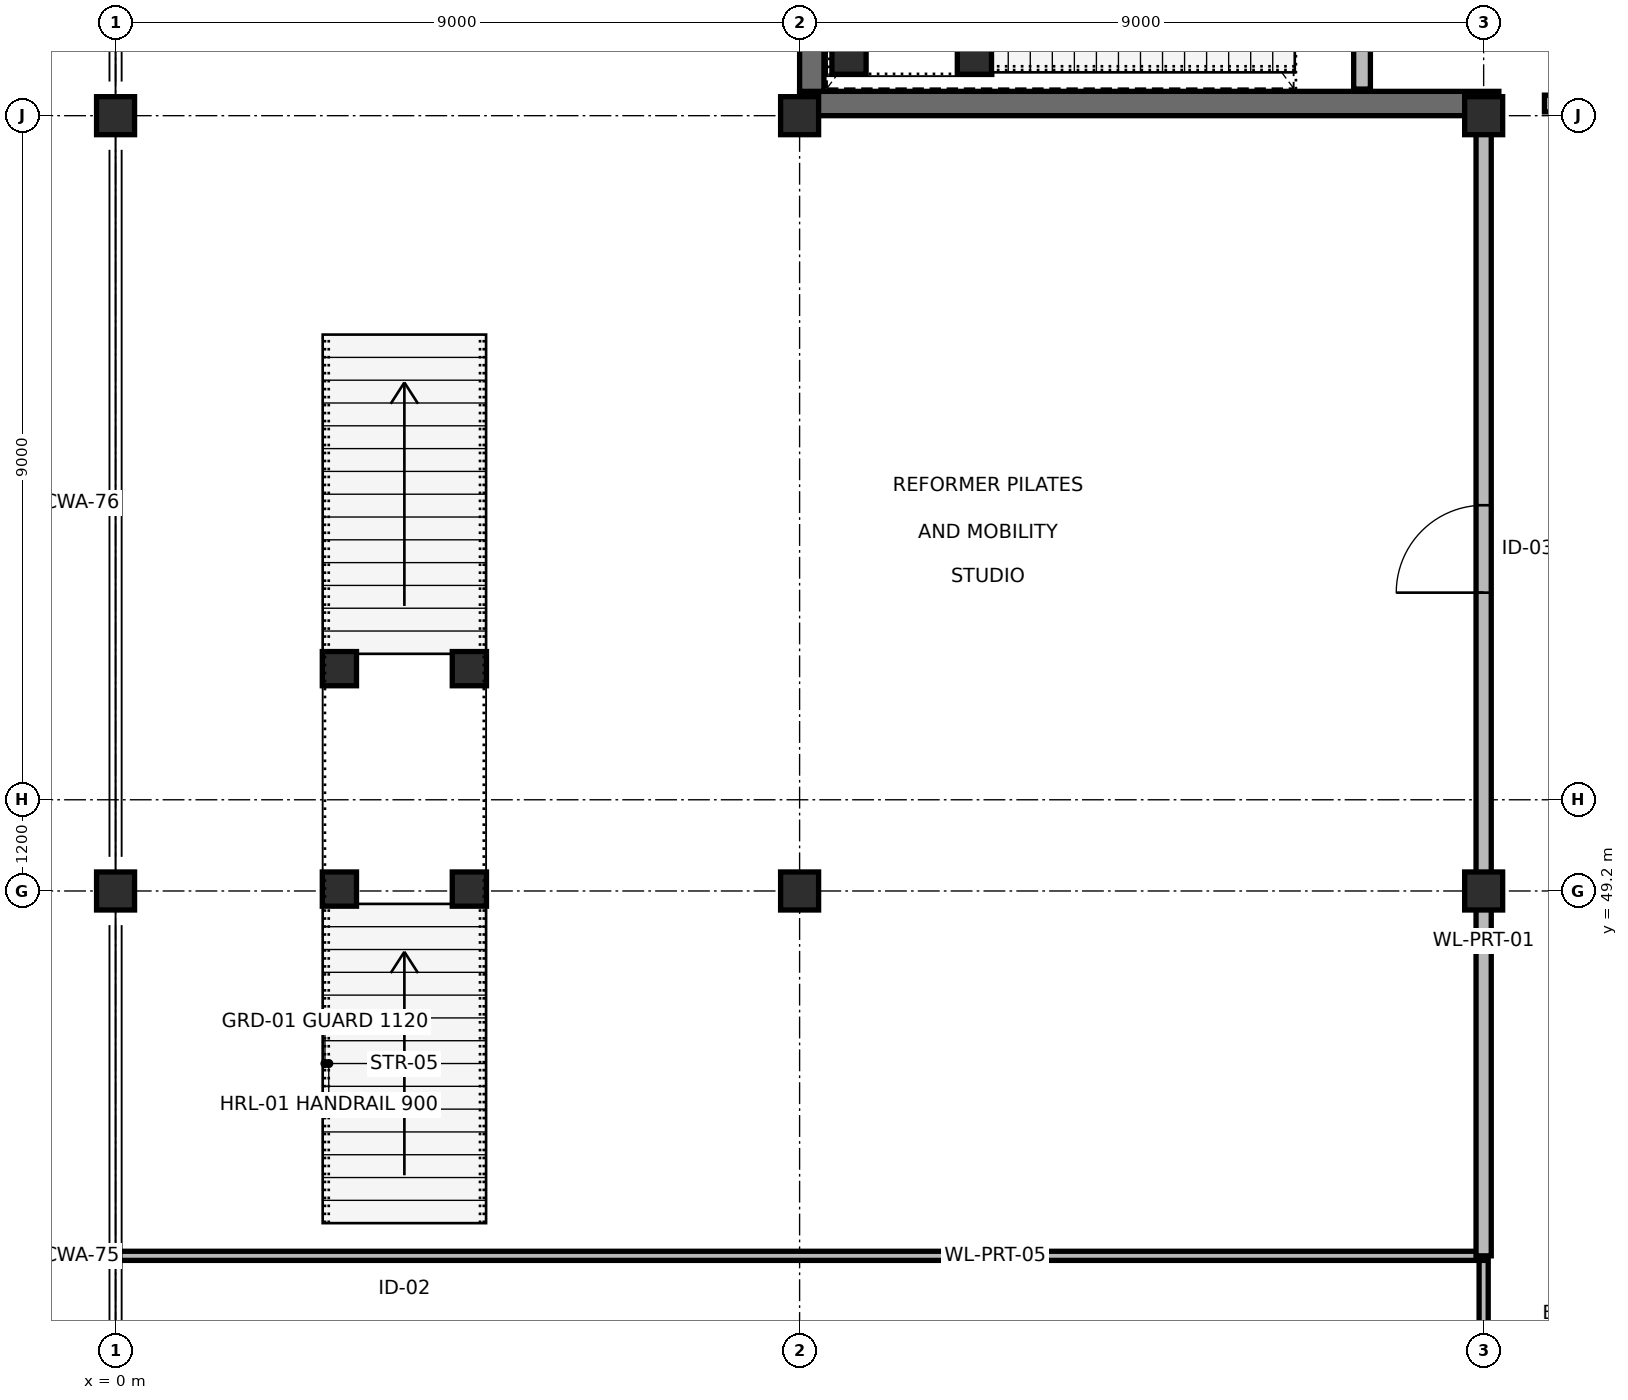
"""IFC4 building model, lengths in metres.
Left out: names, types, materials, properties, quantities, classifications, styles, units other than length and angle.
Written with IfcOpenShell. Run it as: python <this file> out.ifc"""

import sys

from ifc_helpers import new_model, si_unit, direction, frame, frame_2d, origin, origin_2d, place, context, subcontext, project, spatial, rectangle, extrude, element, fill, save


model = new_model("IFC4")
c1 = context("Model", 3, precision=1e-05, world=origin(), true_north=direction((0.0, 1.0)))
c2 = subcontext(c1, "Body", "Model", "MODEL_VIEW")
j1 = project(units=[si_unit("LENGTHUNIT", "METRE"), si_unit("PLANEANGLEUNIT", "RADIAN")], contexts=[c1])
p1 = place(None, origin())
s1 = spatial("IfcSite", under=j1, at=p1, CompositionType="ELEMENT")
p2 = place(p1, origin())
s2 = spatial("IfcBuilding", under=s1, at=p2, CompositionType="ELEMENT")
p3 = place(p2, frame((0.0, 0.0, 14.1)))
s3 = spatial("IfcBuildingStorey", under=s2, at=p3, CompositionType="ELEMENT", Elevation=14.1)
for number, where, z_axis, x_axis in (
    (1, (0.0, 49.2, 0.0), (0.0, 0.0, 1.0), (1.0, 0.0, 0.0)),
    (2, (0.0, 59.4, 0.0), (0.0, 0.0, 1.0), (1.0, 0.0, 0.0)),
    (3, (9.0, 49.2, 0.0), (0.0, 0.0, 1.0), (1.0, 0.0, 0.0)),
    (4, (9.0, 59.4, 0.0), (0.0, 0.0, 1.0), (1.0, 0.0, 0.0)),
    (5, (18.0, 49.2, 0.0), (0.0, 0.0, 1.0), (1.0, 0.0, 0.0)),
    (6, (18.0, 59.4, 0.0), (0.0, 0.0, 1.0), (1.0, 0.0, 0.0)),
):
    element("IfcColumn", number, at=place(p3, frame(where, z_axis=z_axis, x_axis=x_axis)), inside=s3, PredefinedType="COLUMN", context=c2, shape_type="SweptSolid", body=[
        extrude(rectangle(XDim=0.5, YDim=0.5, at=origin_2d()), origin(), (0.0, 0.0, 1.0), 4.5),
    ])
for number, where, z_axis, x_axis in (
    (7, (2.945, 49.225, 0.0), (0.0, 0.0, 1.0), (1.0, 0.0, 0.0)),
    (8, (2.945, 52.125, 0.0), (0.0, 0.0, 1.0), (1.0, 0.0, 0.0)),
    (9, (4.655, 49.225, 0.0), (0.0, 0.0, 1.0), (1.0, 0.0, 0.0)),
    (10, (4.655, 52.125, 0.0), (0.0, 0.0, 1.0), (1.0, 0.0, 0.0)),
):
    element("IfcColumn", number, at=place(p3, frame(where, z_axis=z_axis, x_axis=x_axis)), inside=s3, PredefinedType="COLUMN", context=c2, shape_type="SweptSolid", body=[
        extrude(rectangle(XDim=0.45, YDim=0.45, at=origin_2d()), origin(), (0.0, 0.0, 1.0), 2.09),
    ])
p4 = place(p3, frame((9.0, 59.56, 0.0), z_axis=(0.0, 0.0, 1.0), x_axis=(1.0, 0.0, 0.0)))
e11 = element("IfcWall", 11, at=p4, inside=s3, PredefinedType="SHEAR", context=c2, shape_type="SweptSolid", body=[
    extrude(rectangle(XDim=9.2, YDim=0.32, at=frame_2d((4.6, 0.0))), origin(), (0.0, 0.0, 1.0), 4.5),
])
p5 = place(p3, frame((9.16, 59.72, 0.0), z_axis=(0.0, 0.0, 1.0), x_axis=(0.0, 1.0, 0.0)))
e12 = element("IfcWall", 12, at=p5, inside=s3, PredefinedType="SHEAR", context=c2, shape_type="SweptSolid", body=[
    extrude(rectangle(XDim=8.36, YDim=0.32, at=frame_2d((4.18, 0.0))), origin(), (0.0, 0.0, 1.0), 4.5),
])
p6 = place(p3, frame((16.4, 59.75, 0.0), z_axis=(0.0, 0.0, 1.0), x_axis=(0.0, 1.0, 0.0)))
e13 = element("IfcWall", 13, at=p6, inside=s3, PredefinedType="PARTITIONING", context=c2, shape_type="SweptSolid", body=[
    extrude(rectangle(XDim=3.25, YDim=0.22, at=frame_2d((1.625, 0.0))), origin(), (0.0, 0.0, 1.0), 3.585),
])
p7 = place(p3, frame((18.8, 59.56, 0.0), z_axis=(0.0, 0.0, 1.0), x_axis=(1.0, 0.0, 0.0)))
e14 = element("IfcWall", 14, at=p7, inside=s3, PredefinedType="PARTITIONING", context=c2, shape_type="SweptSolid", body=[
    extrude(rectangle(XDim=4.35, YDim=0.22, at=frame_2d((2.175, 0.0))), origin(), (0.0, 0.0, 1.0), 3.585),
])
p8 = place(p7, frame((0.55, 0.0, 0.0)))
e15 = element("IfcOpeningElement", 15, at=p8, cuts=e14, PredefinedType="OPENING", context=c2, shape_type="SweptSolid", body=[
    extrude(rectangle(XDim=1.8, YDim=2.2, at=frame_2d((0.9, 1.1))), frame((0.0, 0.12, 0.0), z_axis=(0.0, -1.0, 0.0), x_axis=(1.0, 0.0, 0.0)), (0.0, 0.0, 1.0), 0.24),
])
p9 = place(p3, frame((18.0, 22.2, 0.0), z_axis=(0.0, 0.0, 1.0), x_axis=(0.0, 1.0, 0.0)))
e16 = element("IfcWall", 16, at=p9, inside=s3, PredefinedType="PARTITIONING", context=c2, shape_type="SweptSolid", body=[
    extrude(rectangle(XDim=22.2, YDim=0.12, at=frame_2d((11.1, 0.0))), origin(), (0.0, 0.0, 1.0), 3.485),
])
p10 = place(p9, frame((10.65, 0.0, 0.0)))
e17 = element("IfcOpeningElement", 17, at=p10, cuts=e16, PredefinedType="OPENING", context=c2, shape_type="SweptSolid", body=[
    extrude(rectangle(XDim=0.9, YDim=2.1, at=frame_2d((0.45, 1.05))), frame((0.0, 0.07, 0.0), z_axis=(0.0, -1.0, 0.0), x_axis=(1.0, 0.0, 0.0)), (0.0, 0.0, 1.0), 0.14),
])
p11 = place(p3, frame((0.0, 44.4, 0.0), z_axis=(0.0, 0.0, 1.0), x_axis=(1.0, 0.0, 0.0)))
e18 = element("IfcWall", 18, at=p11, inside=s3, PredefinedType="PARTITIONING", context=c2, shape_type="SweptSolid", body=[
    extrude(rectangle(XDim=18.0, YDim=0.12, at=frame_2d((9.0, 0.0))), origin(), (0.0, 0.0, 1.0), 3.535),
])
p12 = place(p3, frame((18.0, 44.4, 0.0), z_axis=(0.0, 0.0, 1.0), x_axis=(0.0, 1.0, 0.0)))
e19 = element("IfcWall", 19, at=p12, inside=s3, PredefinedType="PARTITIONING", context=c2, shape_type="SweptSolid", body=[
    extrude(rectangle(XDim=15.0, YDim=0.2, at=frame_2d((7.5, 0.0))), origin(), (0.0, 0.0, 1.0), 3.485),
])
p13 = place(p12, frame((8.725, 0.0, 0.0)))
e20 = element("IfcOpeningElement", 20, at=p13, cuts=e19, PredefinedType="OPENING", context=c2, shape_type="SweptSolid", body=[
    extrude(rectangle(XDim=1.15, YDim=2.2, at=frame_2d((0.575, 1.1))), frame((0.0, 0.11, 0.0), z_axis=(0.0, -1.0, 0.0), x_axis=(1.0, 0.0, 0.0)), (0.0, 0.0, 1.0), 0.22),
])
for number, where, z_axis, x_axis in (
    (21, (9.65, 60.17, 0.0), (0.0, 0.0, 1.0), (1.0, 0.0, 0.0)),
    (22, (11.3, 60.17, 0.0), (0.0, 0.0, 1.0), (1.0, 0.0, 0.0)),
):
    element("IfcColumn", number, at=place(p3, frame(where, z_axis=z_axis, x_axis=x_axis)), inside=s3, PredefinedType="COLUMN", context=c2, shape_type="SweptSolid", body=[
        extrude(rectangle(XDim=0.45, YDim=0.45, at=origin_2d()), origin(), (0.0, 0.0, 1.0), 4.5),
    ])
p14 = place(p13, origin())
e23 = element("IfcDoor", 23, at=p14, inside=s3, OperationType="SINGLE_SWING_LEFT", PredefinedType="DOOR", context=c2, shape_type="SweptSolid", body=[
    extrude(rectangle(XDim=1.15, YDim=2.2, at=frame_2d((0.575, 1.1))), frame((0.0, 0.025, 0.0), z_axis=(0.0, -1.0, 0.0), x_axis=(1.0, 0.0, 0.0)), (0.0, 0.0, 1.0), 0.05),
])
fill(e20, e23)
save(model, sys.argv[1])
